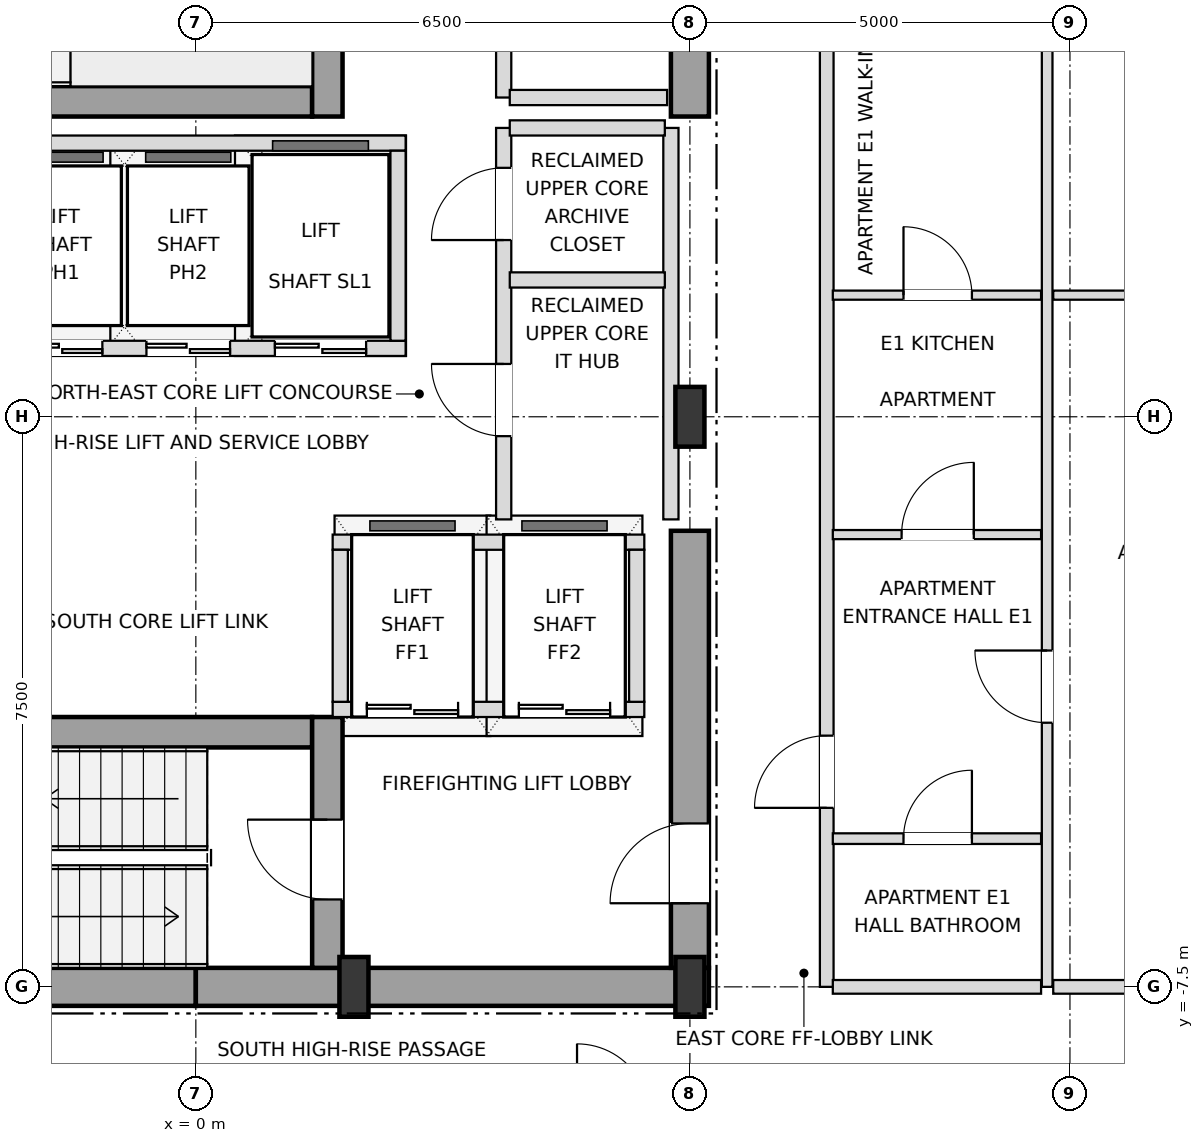
"""IFC4 building model, lengths in metres.
Left out: names, types, materials, properties, quantities, classifications, styles, units other than length and angle.
Written with IfcOpenShell. Run it as: python <this file> out.ifc"""

import sys

from ifc_helpers import new_model, si_unit, direction, frame, frame_2d, origin, origin_2d, place, context, subcontext, project, spatial, rectangle, i_section, extrude, element, fill, save


model = new_model("IFC4")
c1 = context("Model", 3, precision=1e-05, world=origin(), true_north=direction((0.0, 1.0)))
c2 = subcontext(c1, "Body", "Model", "MODEL_VIEW")
j1 = project(units=[si_unit("LENGTHUNIT", "METRE"), si_unit("PLANEANGLEUNIT", "RADIAN")], contexts=[c1])
p1 = place(None, origin())
s1 = spatial("IfcSite", under=j1, at=p1, CompositionType="ELEMENT")
p2 = place(p1, origin())
s2 = spatial("IfcBuilding", under=s1, at=p2, CompositionType="ELEMENT")
p3 = place(p2, frame((0.0, 0.0, 243.9)))
s3 = spatial("IfcBuildingStorey", under=s2, at=p3, CompositionType="ELEMENT", Elevation=243.9)
for number, where, z_axis, x_axis in (
    (1, (2.08, -7.5, 0.0), (0.0, 0.0, 1.0), (1.0, 0.0, 0.0)),
    (2, (6.5, -7.5, 0.0), (0.0, 0.0, 1.0), (1.0, 0.0, 0.0)),
    (3, (6.5, 0.0, 0.0), (0.0, 0.0, 1.0), (1.0, 0.0, 0.0)),
):
    element("IfcColumn", number, at=place(p3, frame(where, z_axis=z_axis, x_axis=x_axis)), inside=s3, PredefinedType="COLUMN", context=c2, shape_type="SweptSolid", body=[
        extrude(i_section(OverallWidth=0.382, OverallDepth=0.786, WebThickness=0.02, FlangeThickness=0.033, at=origin_2d()), origin(), (0.0, 0.0, 1.0), 3.6),
    ])
for number, where, z_axis, x_axis in (
    (4, (-6.75, -7.5, 0.0), (0.0, 0.0, 1.0), (1.0, 0.0, 0.0)),
    (5, (0.0, -7.5, 0.0), (0.0, 0.0, 1.0), (1.0, 0.0, 0.0)),
):
    element("IfcWall", number, at=place(p3, frame(where, z_axis=z_axis, x_axis=x_axis)), inside=s3, PredefinedType="SHEAR", context=c2, shape_type="SweptSolid", body=[
        extrude(rectangle(XDim=6.75, YDim=0.5, at=frame_2d((3.375, 0.0))), origin(), (0.0, 0.0, 1.0), 3.38),
    ])
p4 = place(p3, frame((6.5, -7.25, 0.0), z_axis=(0.0, 0.0, 1.0), x_axis=(0.0, 1.0, 0.0)))
e6 = element("IfcWall", 6, at=p4, inside=s3, PredefinedType="SHEAR", context=c2, shape_type="SweptSolid", body=[
    extrude(rectangle(XDim=5.75, YDim=0.5, at=frame_2d((2.875, 0.0))), origin(), (0.0, 0.0, 1.0), 3.38),
])
p5 = place(p4, frame((0.85, 0.0, 0.0)))
e7 = element("IfcOpeningElement", 7, at=p5, cuts=e6, PredefinedType="OPENING", context=c2, shape_type="SweptSolid", body=[
    extrude(rectangle(XDim=1.05, YDim=2.15, at=frame_2d((0.525, 1.075))), frame((0.0, 0.26, 0.0), z_axis=(0.0, -1.0, 0.0), x_axis=(1.0, 0.0, 0.0)), (0.0, 0.0, 1.0), 0.52),
])
p6 = place(p3, frame((6.5, 3.95, 0.0), z_axis=(0.0, 0.0, 1.0), x_axis=(0.0, 1.0, 0.0)))
e8 = element("IfcWall", 8, at=p6, inside=s3, PredefinedType="SHEAR", context=c2, shape_type="SweptSolid", body=[
    extrude(rectangle(XDim=3.3, YDim=0.5, at=frame_2d((1.65, 0.0))), origin(), (0.0, 0.0, 1.0), 3.38),
])
p7 = place(p3, frame((-6.25, -4.15, 0.0), z_axis=(0.0, 0.0, 1.0), x_axis=(1.0, 0.0, 0.0)))
e9 = element("IfcWall", 9, at=p7, inside=s3, PredefinedType="SHEAR", context=c2, shape_type="SweptSolid", body=[
    extrude(rectangle(XDim=7.78, YDim=0.4, at=frame_2d((3.89, 0.0))), origin(), (0.0, 0.0, 1.0), 3.38),
])
p8 = place(p3, frame((1.73, -7.25, 0.0), z_axis=(0.0, 0.0, 1.0), x_axis=(0.0, 1.0, 0.0)))
e10 = element("IfcWall", 10, at=p8, inside=s3, PredefinedType="SHEAR", context=c2, shape_type="SweptSolid", body=[
    extrude(rectangle(XDim=3.3, YDim=0.4, at=frame_2d((1.65, 0.0))), origin(), (0.0, 0.0, 1.0), 3.38),
])
p9 = place(p8, frame((0.9, 0.0, 0.0)))
e11 = element("IfcOpeningElement", 11, at=p9, cuts=e10, PredefinedType="OPENING", context=c2, shape_type="SweptSolid", body=[
    extrude(rectangle(XDim=1.05, YDim=2.15, at=frame_2d((0.525, 1.075))), frame((0.0, 0.21, 0.0), z_axis=(0.0, -1.0, 0.0), x_axis=(1.0, 0.0, 0.0)), (0.0, 0.0, 1.0), 0.42),
])
p10 = place(p3, frame((-5.55, 4.15, 0.0), z_axis=(0.0, 0.0, 1.0), x_axis=(1.0, 0.0, 0.0)))
e12 = element("IfcWall", 12, at=p10, inside=s3, PredefinedType="SHEAR", context=c2, shape_type="SweptSolid", body=[
    extrude(rectangle(XDim=7.08, YDim=0.4, at=frame_2d((3.54, 0.0))), origin(), (0.0, 0.0, 1.0), 3.38),
])
p11 = place(p3, frame((1.73, 3.95, 0.0), z_axis=(0.0, 0.0, 1.0), x_axis=(0.0, 1.0, 0.0)))
e13 = element("IfcWall", 13, at=p11, inside=s3, PredefinedType="SHEAR", context=c2, shape_type="SweptSolid", body=[
    extrude(rectangle(XDim=3.3, YDim=0.4, at=frame_2d((1.65, 0.0))), origin(), (0.0, 0.0, 1.0), 3.38),
])
p12 = place(p3, frame((-2.82, 0.9, 0.0), z_axis=(0.0, 0.0, 1.0), x_axis=(1.0, 0.0, 0.0)))
e14 = element("IfcWall", 14, at=p12, inside=s3, PredefinedType="SOLIDWALL", context=c2, shape_type="SweptSolid", body=[
    extrude(rectangle(XDim=5.58, YDim=0.2, at=frame_2d((2.79, 0.0))), origin(), (0.0, 0.0, 1.0), 3.38),
])
p13 = place(p12, frame((0.49, 0.0, 0.0)))
e15 = element("IfcOpeningElement", 15, at=p13, cuts=e14, PredefinedType="OPENING", context=c2, shape_type="SweptSolid", body=[
    extrude(rectangle(XDim=1.1, YDim=2.15, at=frame_2d((0.55, 1.075))), frame((0.0, 0.11, 0.0), z_axis=(0.0, -1.0, 0.0), x_axis=(1.0, 0.0, 0.0)), (0.0, 0.0, 1.0), 0.22),
])
p14 = place(p12, frame((2.17, 0.0, 0.0)))
e16 = element("IfcOpeningElement", 16, at=p14, cuts=e14, PredefinedType="OPENING", context=c2, shape_type="SweptSolid", body=[
    extrude(rectangle(XDim=1.1, YDim=2.15, at=frame_2d((0.55, 1.075))), frame((0.0, 0.11, 0.0), z_axis=(0.0, -1.0, 0.0), x_axis=(1.0, 0.0, 0.0)), (0.0, 0.0, 1.0), 0.22),
])
p15 = place(p12, frame((3.86, 0.0, 0.0)))
e17 = element("IfcOpeningElement", 17, at=p15, cuts=e14, PredefinedType="OPENING", context=c2, shape_type="SweptSolid", body=[
    extrude(rectangle(XDim=1.2, YDim=2.2, at=frame_2d((0.6, 1.1))), frame((0.0, 0.11, 0.0), z_axis=(0.0, -1.0, 0.0), x_axis=(1.0, 0.0, 0.0)), (0.0, 0.0, 1.0), 0.22),
])
p16 = place(p3, frame((-2.82, 3.6, 0.0), z_axis=(0.0, 0.0, 1.0), x_axis=(1.0, 0.0, 0.0)))
e18 = element("IfcWall", 18, at=p16, inside=s3, PredefinedType="SOLIDWALL", context=c2, shape_type="SweptSolid", body=[
    extrude(rectangle(XDim=5.58, YDim=0.2, at=frame_2d((2.79, 0.0))), origin(), (0.0, 0.0, 1.0), 3.38),
])
p17 = place(p3, frame((2.66, 1.0, 0.0), z_axis=(0.0, 0.0, 1.0), x_axis=(0.0, 1.0, 0.0)))
e19 = element("IfcWall", 19, at=p17, inside=s3, PredefinedType="SOLIDWALL", context=c2, shape_type="SweptSolid", body=[
    extrude(rectangle(XDim=2.5, YDim=0.2, at=frame_2d((1.25, 0.0))), origin(), (0.0, 0.0, 1.0), 3.38),
])
p18 = place(p3, frame((1.8, -3.85, 0.0), z_axis=(0.0, 0.0, 1.0), x_axis=(1.0, 0.0, 0.0)))
e20 = element("IfcWall", 20, at=p18, inside=s3, PredefinedType="SOLIDWALL", context=c2, shape_type="SweptSolid", body=[
    extrude(rectangle(XDim=4.1, YDim=0.2, at=frame_2d((2.05, 0.0))), origin(), (0.0, 0.0, 1.0), 3.38),
])
p19 = place(p18, frame((0.45, 0.0, 0.0)))
e21 = element("IfcOpeningElement", 21, at=p19, cuts=e20, PredefinedType="OPENING", context=c2, shape_type="SweptSolid", body=[
    extrude(rectangle(XDim=1.2, YDim=2.2, at=frame_2d((0.6, 1.1))), frame((0.0, 0.11, 0.0), z_axis=(0.0, -1.0, 0.0), x_axis=(1.0, 0.0, 0.0)), (0.0, 0.0, 1.0), 0.22),
])
p20 = place(p18, frame((2.45, 0.0, 0.0)))
e22 = element("IfcOpeningElement", 22, at=p20, cuts=e20, PredefinedType="OPENING", context=c2, shape_type="SweptSolid", body=[
    extrude(rectangle(XDim=1.2, YDim=2.2, at=frame_2d((0.6, 1.1))), frame((0.0, 0.11, 0.0), z_axis=(0.0, -1.0, 0.0), x_axis=(1.0, 0.0, 0.0)), (0.0, 0.0, 1.0), 0.22),
])
p21 = place(p3, frame((1.8, -1.65, 0.0), z_axis=(0.0, 0.0, 1.0), x_axis=(1.0, 0.0, 0.0)))
e23 = element("IfcWall", 23, at=p21, inside=s3, PredefinedType="SOLIDWALL", context=c2, shape_type="SweptSolid", body=[
    extrude(rectangle(XDim=4.1, YDim=0.2, at=frame_2d((2.05, 0.0))), origin(), (0.0, 0.0, 1.0), 3.38),
])
for number, where, z_axis, x_axis in (
    (24, (1.9, -3.75, 0.0), (0.0, 0.0, 1.0), (0.0, 1.0, 0.0)),
    (25, (5.8, -3.75, 0.0), (0.0, 0.0, 1.0), (0.0, 1.0, 0.0)),
):
    element("IfcWall", number, at=place(p3, frame(where, z_axis=z_axis, x_axis=x_axis)), inside=s3, PredefinedType="SOLIDWALL", context=c2, shape_type="SweptSolid", body=[
        extrude(rectangle(XDim=2.0, YDim=0.2, at=frame_2d((1.0, 0.0))), origin(), (0.0, 0.0, 1.0), 3.38),
    ])
p22 = place(p3, frame((4.05, -1.35, 0.0), z_axis=(0.0, 0.0, 1.0), x_axis=(0.0, 1.0, 0.0)))
e26 = element("IfcWall", 26, at=p22, inside=s3, PredefinedType="SOLIDWALL", context=c2, shape_type="SweptSolid", body=[
    extrude(rectangle(XDim=5.15, YDim=0.2, at=frame_2d((2.575, 0.0))), origin(), (0.0, 0.0, 1.0), 3.38),
])
p23 = place(p22, frame((1.095, 0.0, 0.0)))
e27 = element("IfcOpeningElement", 27, at=p23, cuts=e26, PredefinedType="OPENING", context=c2, shape_type="SweptSolid", body=[
    extrude(rectangle(XDim=0.95, YDim=2.15, at=frame_2d((0.475, 1.075))), frame((0.0, 0.11, 0.0), z_axis=(0.0, -1.0, 0.0), x_axis=(1.0, 0.0, 0.0)), (0.0, 0.0, 1.0), 0.22),
])
p24 = place(p22, frame((3.675, 0.0, 0.0)))
e28 = element("IfcOpeningElement", 28, at=p24, cuts=e26, PredefinedType="OPENING", context=c2, shape_type="SweptSolid", body=[
    extrude(rectangle(XDim=0.95, YDim=2.15, at=frame_2d((0.475, 1.075))), frame((0.0, 0.11, 0.0), z_axis=(0.0, -1.0, 0.0), x_axis=(1.0, 0.0, 0.0)), (0.0, 0.0, 1.0), 0.22),
])
p25 = place(p3, frame((4.05, 4.2, 0.0), z_axis=(0.0, 0.0, 1.0), x_axis=(0.0, 1.0, 0.0)))
e29 = element("IfcWall", 29, at=p25, inside=s3, PredefinedType="SOLIDWALL", context=c2, shape_type="SweptSolid", body=[
    extrude(rectangle(XDim=3.05, YDim=0.2, at=frame_2d((1.525, 0.0))), origin(), (0.0, 0.0, 1.0), 3.38),
])
p26 = place(p25, frame((0.975, 0.0, 0.0)))
e30 = element("IfcOpeningElement", 30, at=p26, cuts=e29, PredefinedType="OPENING", context=c2, shape_type="SweptSolid", body=[
    extrude(rectangle(XDim=0.95, YDim=2.15, at=frame_2d((0.475, 1.075))), frame((0.0, 0.11, 0.0), z_axis=(0.0, -1.0, 0.0), x_axis=(1.0, 0.0, 0.0)), (0.0, 0.0, 1.0), 0.22),
])
p27 = place(p3, frame((6.25, -1.35, 0.0), z_axis=(0.0, 0.0, 1.0), x_axis=(0.0, 1.0, 0.0)))
e31 = element("IfcWall", 31, at=p27, inside=s3, PredefinedType="SOLIDWALL", context=c2, shape_type="SweptSolid", body=[
    extrude(rectangle(XDim=5.15, YDim=0.2, at=frame_2d((2.575, 0.0))), origin(), (0.0, 0.0, 1.0), 3.38),
])
p28 = place(p3, frame((8.3, -7.5, 0.0), z_axis=(0.0, 0.0, 1.0), x_axis=(0.0, 1.0, 0.0)))
e32 = element("IfcWall", 32, at=p28, inside=s3, PredefinedType="PARTITIONING", context=c2, shape_type="SweptSolid", body=[
    extrude(rectangle(XDim=15.0, YDim=0.18, at=frame_2d((7.5, 0.0))), origin(), (0.0, 0.0, 1.0), 3.38),
])
p29 = place(p28, frame((2.355, 0.0, 0.0)))
e33 = element("IfcOpeningElement", 33, at=p29, cuts=e32, PredefinedType="OPENING", context=c2, shape_type="SweptSolid", body=[
    extrude(rectangle(XDim=0.95, YDim=2.15, at=frame_2d((0.475, 1.075))), frame((0.0, 0.1, 0.0), z_axis=(0.0, -1.0, 0.0), x_axis=(1.0, 0.0, 0.0)), (0.0, 0.0, 1.0), 0.2),
])
p30 = place(p3, frame((11.2, -7.5, 0.0), z_axis=(0.0, 0.0, 1.0), x_axis=(0.0, 1.0, 0.0)))
e34 = element("IfcWall", 34, at=p30, inside=s3, PredefinedType="PARTITIONING", context=c2, shape_type="SweptSolid", body=[
    extrude(rectangle(XDim=15.0, YDim=0.14, at=frame_2d((7.5, 0.0))), origin(), (0.0, 0.0, 1.0), 3.38),
])
p31 = place(p30, frame((3.475, 0.0, 0.0)))
e35 = element("IfcOpeningElement", 35, at=p31, cuts=e34, PredefinedType="OPENING", context=c2, shape_type="SweptSolid", body=[
    extrude(rectangle(XDim=0.95, YDim=2.1, at=frame_2d((0.475, 1.05))), frame((0.0, 0.08, 0.0), z_axis=(0.0, -1.0, 0.0), x_axis=(1.0, 0.0, 0.0)), (0.0, 0.0, 1.0), 0.16),
])
p32 = place(p3, frame((8.38, -7.5, 0.0), z_axis=(0.0, 0.0, 1.0), x_axis=(1.0, 0.0, 0.0)))
e36 = element("IfcWall", 36, at=p32, inside=s3, PredefinedType="PARTITIONING", context=c2, shape_type="SweptSolid", body=[
    extrude(rectangle(XDim=2.74, YDim=0.18, at=frame_2d((1.37, 0.0))), origin(), (0.0, 0.0, 1.0), 2.826),
])
p33 = place(p3, frame((11.28, -7.5, 0.0), z_axis=(0.0, 0.0, 1.0), x_axis=(1.0, 0.0, 0.0)))
e37 = element("IfcWall", 37, at=p33, inside=s3, PredefinedType="PARTITIONING", context=c2, shape_type="SweptSolid", body=[
    extrude(rectangle(XDim=5.62, YDim=0.18, at=frame_2d((2.81, 0.0))), origin(), (0.0, 0.0, 1.0), 2.826),
])
p34 = place(p3, frame((8.38, -5.55, 0.0), z_axis=(0.0, 0.0, 1.0), x_axis=(1.0, 0.0, 0.0)))
e38 = element("IfcWall", 38, at=p34, inside=s3, PredefinedType="PARTITIONING", context=c2, shape_type="SweptSolid", body=[
    extrude(rectangle(XDim=2.74, YDim=0.14, at=frame_2d((1.37, 0.0))), origin(), (0.0, 0.0, 1.0), 3.38),
])
p35 = place(p34, frame((0.93, 0.0, 0.0)))
e39 = element("IfcOpeningElement", 39, at=p35, cuts=e38, PredefinedType="OPENING", context=c2, shape_type="SweptSolid", body=[
    extrude(rectangle(XDim=0.9, YDim=2.1, at=frame_2d((0.45, 1.05))), frame((0.0, 0.08, 0.0), z_axis=(0.0, -1.0, 0.0), x_axis=(1.0, 0.0, 0.0)), (0.0, 0.0, 1.0), 0.16),
])
p36 = place(p3, frame((8.38, -1.55, 0.0), z_axis=(0.0, 0.0, 1.0), x_axis=(1.0, 0.0, 0.0)))
e40 = element("IfcWall", 40, at=p36, inside=s3, PredefinedType="PARTITIONING", context=c2, shape_type="SweptSolid", body=[
    extrude(rectangle(XDim=2.74, YDim=0.12, at=frame_2d((1.37, 0.0))), origin(), (0.0, 0.0, 1.0), 3.38),
])
p37 = place(p36, frame((0.905, 0.0, 0.0)))
e41 = element("IfcOpeningElement", 41, at=p37, cuts=e40, PredefinedType="OPENING", context=c2, shape_type="SweptSolid", body=[
    extrude(rectangle(XDim=0.95, YDim=2.1, at=frame_2d((0.475, 1.05))), frame((0.0, 0.07, 0.0), z_axis=(0.0, -1.0, 0.0), x_axis=(1.0, 0.0, 0.0)), (0.0, 0.0, 1.0), 0.14),
])
p38 = place(p3, frame((8.38, 1.6, 0.0), z_axis=(0.0, 0.0, 1.0), x_axis=(1.0, 0.0, 0.0)))
e42 = element("IfcWall", 42, at=p38, inside=s3, PredefinedType="PARTITIONING", context=c2, shape_type="SweptSolid", body=[
    extrude(rectangle(XDim=2.74, YDim=0.12, at=frame_2d((1.37, 0.0))), origin(), (0.0, 0.0, 1.0), 3.38),
])
p39 = place(p38, frame((0.93, 0.0, 0.0)))
e43 = element("IfcOpeningElement", 43, at=p39, cuts=e42, PredefinedType="OPENING", context=c2, shape_type="SweptSolid", body=[
    extrude(rectangle(XDim=0.9, YDim=2.1, at=frame_2d((0.45, 1.05))), frame((0.0, 0.07, 0.0), z_axis=(0.0, -1.0, 0.0), x_axis=(1.0, 0.0, 0.0)), (0.0, 0.0, 1.0), 0.14),
])
p40 = place(p3, frame((11.28, 1.6, 0.0), z_axis=(0.0, 0.0, 1.0), x_axis=(1.0, 0.0, 0.0)))
e44 = element("IfcWall", 44, at=p40, inside=s3, PredefinedType="PARTITIONING", context=c2, shape_type="SweptSolid", body=[
    extrude(rectangle(XDim=5.54, YDim=0.12, at=frame_2d((2.77, 0.0))), origin(), (0.0, 0.0, 1.0), 3.018),
])
p41 = place(p40, frame((2.33, 0.0, 0.0)))
e45 = element("IfcOpeningElement", 45, at=p41, cuts=e44, PredefinedType="OPENING", context=c2, shape_type="SweptSolid", body=[
    extrude(rectangle(XDim=0.9, YDim=2.1, at=frame_2d((0.45, 1.05))), frame((0.0, 0.07, 0.0), z_axis=(0.0, -1.0, 0.0), x_axis=(1.0, 0.0, 0.0)), (0.0, 0.0, 1.0), 0.14),
])
for number, where, z_axis, x_axis in (
    (46, (4.13, 1.8, 0.0), (0.0, 0.0, 1.0), (1.0, 0.0, 0.0)),
    (47, (4.13, 3.8, 0.0), (0.0, 0.0, 1.0), (1.0, 0.0, 0.0)),
):
    element("IfcWall", number, at=place(p3, frame(where, z_axis=z_axis, x_axis=x_axis)), inside=s3, PredefinedType="SOLIDWALL", context=c2, shape_type="SweptSolid", body=[
        extrude(rectangle(XDim=2.04, YDim=0.2, at=frame_2d((1.02, 0.0))), origin(), (0.0, 0.0, 1.0), 3.38),
    ])
p42 = place(p3, frame((4.13, 4.2, 0.0), z_axis=(0.0, 0.0, 1.0), x_axis=(1.0, 0.0, 0.0)))
e48 = element("IfcWall", 48, at=p42, inside=s3, PredefinedType="SOLIDWALL", context=c2, shape_type="SweptSolid", body=[
    extrude(rectangle(XDim=2.07, YDim=0.2, at=frame_2d((1.035, 0.0))), origin(), (0.0, 0.0, 1.0), 3.38),
])
p43 = place(p5, origin())
e49 = element("IfcDoor", 49, at=p43, inside=s3, OperationType="SINGLE_SWING_LEFT", PredefinedType="DOOR", context=c2, shape_type="SweptSolid", body=[
    extrude(rectangle(XDim=1.05, YDim=2.15, at=frame_2d((0.525, 1.075))), frame((0.0, 0.025, 0.0), z_axis=(0.0, -1.0, 0.0), x_axis=(1.0, 0.0, 0.0)), (0.0, 0.0, 1.0), 0.05),
])
fill(e7, e49)
p44 = place(p9, origin())
e50 = element("IfcDoor", 50, at=p44, inside=s3, OperationType="SINGLE_SWING_RIGHT", PredefinedType="DOOR", context=c2, shape_type="SweptSolid", body=[
    extrude(rectangle(XDim=1.05, YDim=2.15, at=frame_2d((0.525, 1.075))), frame((0.0, 0.025, 0.0), z_axis=(0.0, -1.0, 0.0), x_axis=(1.0, 0.0, 0.0)), (0.0, 0.0, 1.0), 0.05),
])
fill(e11, e50)
p45 = place(p13, origin())
e51 = element("IfcDoor", 51, at=p45, inside=s3, OperationType="DOUBLE_DOOR_SLIDING", PredefinedType="DOOR", context=c2, shape_type="SweptSolid", body=[
    extrude(rectangle(XDim=1.1, YDim=2.15, at=frame_2d((0.55, 1.075))), frame((0.0, 0.025, 0.0), z_axis=(0.0, -1.0, 0.0), x_axis=(1.0, 0.0, 0.0)), (0.0, 0.0, 1.0), 0.05),
])
fill(e15, e51)
p46 = place(p14, origin())
e52 = element("IfcDoor", 52, at=p46, inside=s3, OperationType="DOUBLE_DOOR_SLIDING", PredefinedType="DOOR", context=c2, shape_type="SweptSolid", body=[
    extrude(rectangle(XDim=1.1, YDim=2.15, at=frame_2d((0.55, 1.075))), frame((0.0, 0.025, 0.0), z_axis=(0.0, -1.0, 0.0), x_axis=(1.0, 0.0, 0.0)), (0.0, 0.0, 1.0), 0.05),
])
fill(e16, e52)
p47 = place(p15, origin())
e53 = element("IfcDoor", 53, at=p47, inside=s3, OperationType="DOUBLE_DOOR_SLIDING", PredefinedType="DOOR", context=c2, shape_type="SweptSolid", body=[
    extrude(rectangle(XDim=1.2, YDim=2.2, at=frame_2d((0.6, 1.1))), frame((0.0, 0.025, 0.0), z_axis=(0.0, -1.0, 0.0), x_axis=(1.0, 0.0, 0.0)), (0.0, 0.0, 1.0), 0.05),
])
fill(e17, e53)
p48 = place(p19, origin())
e54 = element("IfcDoor", 54, at=p48, inside=s3, OperationType="DOUBLE_DOOR_SLIDING", PredefinedType="DOOR", context=c2, shape_type="SweptSolid", body=[
    extrude(rectangle(XDim=1.2, YDim=2.2, at=frame_2d((0.6, 1.1))), frame((0.0, 0.025, 0.0), z_axis=(0.0, -1.0, 0.0), x_axis=(1.0, 0.0, 0.0)), (0.0, 0.0, 1.0), 0.05),
])
fill(e21, e54)
p49 = place(p20, origin())
e55 = element("IfcDoor", 55, at=p49, inside=s3, OperationType="DOUBLE_DOOR_SLIDING", PredefinedType="DOOR", context=c2, shape_type="SweptSolid", body=[
    extrude(rectangle(XDim=1.2, YDim=2.2, at=frame_2d((0.6, 1.1))), frame((0.0, 0.025, 0.0), z_axis=(0.0, -1.0, 0.0), x_axis=(1.0, 0.0, 0.0)), (0.0, 0.0, 1.0), 0.05),
])
fill(e22, e55)
p50 = place(p23, origin())
e56 = element("IfcDoor", 56, at=p50, inside=s3, OperationType="SINGLE_SWING_RIGHT", PredefinedType="DOOR", context=c2, shape_type="SweptSolid", body=[
    extrude(rectangle(XDim=0.95, YDim=2.15, at=frame_2d((0.475, 1.075))), frame((0.0, 0.025, 0.0), z_axis=(0.0, -1.0, 0.0), x_axis=(1.0, 0.0, 0.0)), (0.0, 0.0, 1.0), 0.05),
])
fill(e27, e56)
p51 = place(p24, origin())
e57 = element("IfcDoor", 57, at=p51, inside=s3, OperationType="SINGLE_SWING_LEFT", PredefinedType="DOOR", context=c2, shape_type="SweptSolid", body=[
    extrude(rectangle(XDim=0.95, YDim=2.15, at=frame_2d((0.475, 1.075))), frame((0.0, 0.025, 0.0), z_axis=(0.0, -1.0, 0.0), x_axis=(1.0, 0.0, 0.0)), (0.0, 0.0, 1.0), 0.05),
])
fill(e28, e57)
p52 = place(p35, origin())
e58 = element("IfcDoor", 58, at=p52, inside=s3, OperationType="SINGLE_SWING_RIGHT", PredefinedType="DOOR", context=c2, shape_type="SweptSolid", body=[
    extrude(rectangle(XDim=0.9, YDim=2.1, at=frame_2d((0.45, 1.05))), frame((0.0, 0.025, 0.0), z_axis=(0.0, -1.0, 0.0), x_axis=(1.0, 0.0, 0.0)), (0.0, 0.0, 1.0), 0.05),
])
fill(e39, e58)
p53 = place(p29, origin())
e59 = element("IfcDoor", 59, at=p53, inside=s3, OperationType="SINGLE_SWING_LEFT", PredefinedType="DOOR", context=c2, shape_type="SweptSolid", body=[
    extrude(rectangle(XDim=0.95, YDim=2.15, at=frame_2d((0.475, 1.075))), frame((0.0, 0.025, 0.0), z_axis=(0.0, -1.0, 0.0), x_axis=(1.0, 0.0, 0.0)), (0.0, 0.0, 1.0), 0.05),
])
fill(e33, e59)
p54 = place(p37, origin())
e60 = element("IfcDoor", 60, at=p54, inside=s3, OperationType="SINGLE_SWING_RIGHT", PredefinedType="DOOR", context=c2, shape_type="SweptSolid", body=[
    extrude(rectangle(XDim=0.95, YDim=2.1, at=frame_2d((0.475, 1.05))), frame((0.0, 0.025, 0.0), z_axis=(0.0, -1.0, 0.0), x_axis=(1.0, 0.0, 0.0)), (0.0, 0.0, 1.0), 0.05),
])
fill(e41, e60)
p55 = place(p39, origin())
e61 = element("IfcDoor", 61, at=p55, inside=s3, OperationType="SINGLE_SWING_LEFT", PredefinedType="DOOR", context=c2, shape_type="SweptSolid", body=[
    extrude(rectangle(XDim=0.9, YDim=2.1, at=frame_2d((0.45, 1.05))), frame((0.0, 0.025, 0.0), z_axis=(0.0, -1.0, 0.0), x_axis=(1.0, 0.0, 0.0)), (0.0, 0.0, 1.0), 0.05),
])
fill(e43, e61)
p56 = place(p31, origin())
e62 = element("IfcDoor", 62, at=p56, inside=s3, OperationType="SINGLE_SWING_RIGHT", PredefinedType="DOOR", context=c2, shape_type="SweptSolid", body=[
    extrude(rectangle(XDim=0.95, YDim=2.1, at=frame_2d((0.475, 1.05))), frame((0.0, 0.025, 0.0), z_axis=(0.0, -1.0, 0.0), x_axis=(1.0, 0.0, 0.0)), (0.0, 0.0, 1.0), 0.05),
])
fill(e35, e62)
save(model, sys.argv[1])
